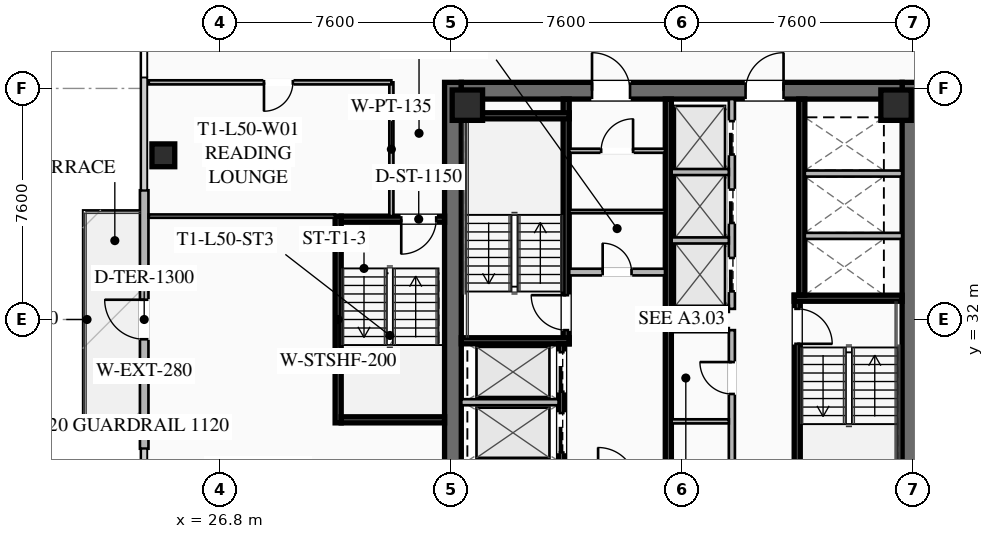
"""IFC4 building model, lengths in metres.
Left out: names, types, materials, properties, quantities, classifications, styles, units other than length and angle.
Written with IfcOpenShell. Run it as: python <this file> out.ifc"""

import sys

from ifc_helpers import new_model, si_unit, direction, frame, frame_2d, origin, origin_2d, place, context, subcontext, project, spatial, rectangle, hollow_rectangle, extrude, element, fill, save


model = new_model("IFC4")
c1 = context("Model", 3, precision=1e-05, world=origin(), true_north=direction((0.0, 1.0)))
c2 = subcontext(c1, "Body", "Model", "MODEL_VIEW")
j1 = project(units=[si_unit("LENGTHUNIT", "METRE"), si_unit("PLANEANGLEUNIT", "RADIAN")], contexts=[c1])
p1 = place(None, origin())
s1 = spatial("IfcSite", under=j1, at=p1, CompositionType="ELEMENT")
p2 = place(p1, origin())
s2 = spatial("IfcBuilding", under=s1, at=p2, CompositionType="ELEMENT")
p3 = place(p2, frame((0.0, 0.0, 185.4)))
s3 = spatial("IfcBuildingStorey", under=s2, at=p3, CompositionType="ELEMENT", Elevation=185.4)
for number, where, z_axis, x_axis in (
    (1, (34.475, 24.2, 0.0), (0.0, 0.0, 1.0), (0.0, 1.0, 0.0)),
    (2, (49.525, 39.8, 0.0), (0.0, 0.0, 1.0), (0.0, -1.0, 0.0)),
):
    element("IfcWall", number, at=place(p3, frame(where, z_axis=z_axis, x_axis=x_axis)), inside=s3, PredefinedType="SHEAR", context=c2, shape_type="SweptSolid", body=[
        extrude(rectangle(XDim=15.6, YDim=0.55, at=frame_2d((7.8, 0.0))), origin(), (0.0, 0.0, 1.0), 3.55),
    ])
p4 = place(p3, frame((34.75, 39.525, 0.0), z_axis=(0.0, 0.0, 1.0), x_axis=(1.0, 0.0, 0.0)))
e3 = element("IfcWall", 3, at=p4, inside=s3, PredefinedType="SHEAR", context=c2, shape_type="SweptSolid", body=[
    extrude(rectangle(XDim=14.5, YDim=0.55, at=frame_2d((7.25, 0.0))), origin(), (0.0, 0.0, 1.0), 3.55),
])
p5 = place(p4, frame((4.3, 0.0, 0.0)))
e4 = element("IfcOpeningElement", 4, at=p5, cuts=e3, PredefinedType="OPENING", context=c2, shape_type="SweptSolid", body=[
    extrude(rectangle(XDim=1.25, YDim=2.25, at=frame_2d((0.625, 1.125))), frame((0.0, 0.285, 0.0), z_axis=(0.0, -1.0, 0.0), x_axis=(1.0, 0.0, 0.0)), (0.0, 0.0, 1.0), 0.57),
])
p6 = place(p4, frame((9.35, 0.0, 0.0)))
e5 = element("IfcOpeningElement", 5, at=p6, cuts=e3, PredefinedType="OPENING", context=c2, shape_type="SweptSolid", body=[
    extrude(rectangle(XDim=1.25, YDim=2.25, at=frame_2d((0.625, 1.125))), frame((0.0, 0.285, 0.0), z_axis=(0.0, -1.0, 0.0), x_axis=(1.0, 0.0, 0.0)), (0.0, 0.0, 1.0), 0.57),
])
for number, where, z_axis, x_axis in (
    (6, (49.05, 39.05, 0.0), (0.0, 0.0, 1.0), (1.0, 0.0, 0.0)),
    (7, (34.95, 39.05, 0.0), (0.0, 0.0, 1.0), (1.0, 0.0, 0.0)),
):
    element("IfcColumn", number, at=place(p3, frame(where, z_axis=z_axis, x_axis=x_axis)), inside=s3, PredefinedType="COLUMN", context=c2, shape_type="SweptSolid", body=[
        extrude(hollow_rectangle(XDim=1.0, YDim=1.0, WallThickness=0.04, at=origin_2d()), origin(), (0.0, 0.0, 1.0), 3.37),
    ])
p7 = place(p3, frame((24.95, 37.4, 0.0), z_axis=(0.0, 0.0, 1.0), x_axis=(1.0, 0.0, 0.0)))
e8 = element("IfcColumn", 8, at=p7, inside=s3, PredefinedType="COLUMN", context=c2, shape_type="SweptSolid", body=[
    extrude(hollow_rectangle(XDim=0.75, YDim=0.75, WallThickness=0.032, at=origin_2d()), origin(), (0.0, 0.0, 1.0), 3.37),
])
p8 = place(p3, frame((24.32, 27.75, 0.0), z_axis=(0.0, 0.0, 1.0), x_axis=(0.0, 1.0, 0.0)))
e9 = element("IfcWall", 9, at=p8, inside=s3, PredefinedType="SOLIDWALL", context=c2, shape_type="SweptSolid", body=[
    extrude(rectangle(XDim=8.5, YDim=0.28, at=frame_2d((4.25, 0.0))), origin(), (0.0, 0.0, 1.0), 3.37),
])
p9 = place(p8, frame((3.6, 0.0, 0.0)))
e10 = element("IfcOpeningElement", 10, at=p9, cuts=e9, PredefinedType="OPENING", context=c2, shape_type="SweptSolid", body=[
    extrude(rectangle(XDim=1.3, YDim=2.15, at=frame_2d((0.65, 1.075))), frame((0.0, 0.15, 0.0), z_axis=(0.0, -1.0, 0.0), x_axis=(1.0, 0.0, 0.0)), (0.0, 0.0, 1.0), 0.3),
])
p10 = place(p3, frame((38.2, 31.2, 0.0), z_axis=(0.0, 0.0, 1.0), x_axis=(0.0, 1.0, 0.0)))
e11 = element("IfcWall", 11, at=p10, inside=s3, PredefinedType="SHEAR", context=c2, shape_type="SweptSolid", body=[
    extrude(rectangle(XDim=8.05, YDim=0.2, at=frame_2d((4.025, 0.0))), origin(), (0.0, 0.0, 1.0), 3.37),
])
p11 = place(p10, frame((0.45, 0.0, 0.0)))
e12 = element("IfcOpeningElement", 12, at=p11, cuts=e11, PredefinedType="OPENING", context=c2, shape_type="SweptSolid", body=[
    extrude(rectangle(XDim=1.15, YDim=2.2, at=frame_2d((0.575, 1.1))), frame((0.0, 0.11, 0.0), z_axis=(0.0, -1.0, 0.0), x_axis=(1.0, 0.0, 0.0)), (0.0, 0.0, 1.0), 0.22),
])
for number, where, z_axis, x_axis in (
    (13, (34.75, 31.3, 0.0), (0.0, 0.0, 1.0), (1.0, 0.0, 0.0)),
    (14, (34.75, 38.7, 0.0), (0.0, 0.0, 1.0), (1.0, 0.0, 0.0)),
):
    element("IfcWall", number, at=place(p3, frame(where, z_axis=z_axis, x_axis=x_axis)), inside=s3, PredefinedType="SHEAR", context=c2, shape_type="SweptSolid", body=[
        extrude(rectangle(XDim=3.55, YDim=0.2, at=frame_2d((1.775, 0.0))), origin(), (0.0, 0.0, 1.0), 3.37),
    ])
p12 = place(p3, frame((45.8, 32.8, 0.0), z_axis=(0.0, 0.0, 1.0), x_axis=(0.0, -1.0, 0.0)))
e15 = element("IfcWall", 15, at=p12, inside=s3, PredefinedType="SHEAR", context=c2, shape_type="SweptSolid", body=[
    extrude(rectangle(XDim=8.05, YDim=0.2, at=frame_2d((4.025, 0.0))), origin(), (0.0, 0.0, 1.0), 3.37),
])
p13 = place(p12, frame((0.45, 0.0, 0.0)))
e16 = element("IfcOpeningElement", 16, at=p13, cuts=e15, PredefinedType="OPENING", context=c2, shape_type="SweptSolid", body=[
    extrude(rectangle(XDim=1.15, YDim=2.2, at=frame_2d((0.575, 1.1))), frame((0.0, 0.11, 0.0), z_axis=(0.0, -1.0, 0.0), x_axis=(1.0, 0.0, 0.0)), (0.0, 0.0, 1.0), 0.22),
])
p14 = place(p3, frame((45.7, 32.7, 0.0), z_axis=(0.0, 0.0, 1.0), x_axis=(1.0, 0.0, 0.0)))
e17 = element("IfcWall", 17, at=p14, inside=s3, PredefinedType="SHEAR", context=c2, shape_type="SweptSolid", body=[
    extrude(rectangle(XDim=3.55, YDim=0.2, at=frame_2d((1.775, 0.0))), origin(), (0.0, 0.0, 1.0), 3.37),
])
p15 = place(p3, frame((41.56, 24.75, 0.0), z_axis=(0.0, 0.0, 1.0), x_axis=(0.0, 1.0, 0.0)))
e18 = element("IfcWall", 18, at=p15, inside=s3, PredefinedType="SHEAR", context=c2, shape_type="SweptSolid", body=[
    extrude(rectangle(XDim=14.5, YDim=0.2, at=frame_2d((7.25, 0.0))), origin(), (0.0, 0.0, 1.0), 3.37),
])
p16 = place(p3, frame((38.3, 33.56, 0.0), z_axis=(0.0, 0.0, 1.0), x_axis=(1.0, 0.0, 0.0)))
e19 = element("IfcWall", 19, at=p16, inside=s3, PredefinedType="SOLIDWALL", context=c2, shape_type="SweptSolid", body=[
    extrude(rectangle(XDim=3.15, YDim=0.22, at=frame_2d((1.575, 0.0))), origin(), (0.0, 0.0, 1.0), 2.723),
])
p17 = place(p16, frame((1.1, 0.0, 0.0)))
e20 = element("IfcOpeningElement", 20, at=p17, cuts=e19, PredefinedType="OPENING", context=c2, shape_type="SweptSolid", body=[
    extrude(rectangle(XDim=0.95, YDim=2.05, at=frame_2d((0.475, 1.025))), frame((0.0, 0.12, 0.0), z_axis=(0.0, -1.0, 0.0), x_axis=(1.0, 0.0, 0.0)), (0.0, 0.0, 1.0), 0.24),
])
p18 = place(p3, frame((38.05, 24.75, 0.0), z_axis=(0.0, 0.0, 1.0), x_axis=(0.0, 1.0, 0.0)))
e21 = element("IfcWall", 21, at=p18, inside=s3, PredefinedType="SHEAR", context=c2, shape_type="SweptSolid", body=[
    extrude(rectangle(XDim=6.45, YDim=0.2, at=frame_2d((3.225, 0.0))), origin(), (0.0, 0.0, 1.0), 3.37),
])
p19 = place(p18, frame((4.875, 0.0, 0.0)))
e22 = element("IfcOpeningElement", 22, at=p19, cuts=e21, PredefinedType="OPENING", context=c2, shape_type="SweptSolid", body=[
    extrude(rectangle(XDim=1.3, YDim=2.25, at=frame_2d((0.65, 1.125))), frame((0.0, 0.11, 0.0), z_axis=(0.0, -1.0, 0.0), x_axis=(1.0, 0.0, 0.0)), (0.0, 0.0, 1.0), 0.22),
])
p20 = place(p18, frame((2.875, 0.0, 0.0)))
e23 = element("IfcOpeningElement", 23, at=p20, cuts=e21, PredefinedType="OPENING", context=c2, shape_type="SweptSolid", body=[
    extrude(rectangle(XDim=1.3, YDim=2.25, at=frame_2d((0.65, 1.125))), frame((0.0, 0.11, 0.0), z_axis=(0.0, -1.0, 0.0), x_axis=(1.0, 0.0, 0.0)), (0.0, 0.0, 1.0), 0.22),
])
p21 = place(p18, frame((0.675, 0.0, 0.0)))
e24 = element("IfcOpeningElement", 24, at=p21, cuts=e21, PredefinedType="OPENING", context=c2, shape_type="SweptSolid", body=[
    extrude(rectangle(XDim=1.3, YDim=2.25, at=frame_2d((0.65, 1.125))), frame((0.0, 0.11, 0.0), z_axis=(0.0, -1.0, 0.0), x_axis=(1.0, 0.0, 0.0)), (0.0, 0.0, 1.0), 0.22),
])
p22 = place(p3, frame((34.75, 29.28, 0.0), z_axis=(0.0, 0.0, 1.0), x_axis=(1.0, 0.0, 0.0)))
e25 = element("IfcWall", 25, at=p22, inside=s3, PredefinedType="SOLIDWALL", context=c2, shape_type="SweptSolid", body=[
    extrude(rectangle(XDim=3.2, YDim=0.2, at=frame_2d((1.6, 0.0))), origin(), (0.0, 0.0, 1.0), 3.37),
])
p23 = place(p3, frame((45.95, 39.25, 0.0), z_axis=(0.0, 0.0, 1.0), x_axis=(0.0, -1.0, 0.0)))
e26 = element("IfcWall", 26, at=p23, inside=s3, PredefinedType="SHEAR", context=c2, shape_type="SweptSolid", body=[
    extrude(rectangle(XDim=6.45, YDim=0.2, at=frame_2d((3.225, 0.0))), origin(), (0.0, 0.0, 1.0), 3.37),
])
for number, where, z_axis, x_axis in (
    (27, (46.05, 34.75, 0.0), (0.0, 0.0, 1.0), (1.0, 0.0, 0.0)),
    (28, (46.05, 36.8, 0.0), (0.0, 0.0, 1.0), (1.0, 0.0, 0.0)),
):
    element("IfcWall", number, at=place(p3, frame(where, z_axis=z_axis, x_axis=x_axis)), inside=s3, PredefinedType="SOLIDWALL", context=c2, shape_type="SweptSolid", body=[
        extrude(rectangle(XDim=3.2, YDim=0.2, at=frame_2d((1.6, 0.0))), origin(), (0.0, 0.0, 1.0), 3.37),
    ])
p24 = place(p3, frame((38.3, 37.55, 0.0), z_axis=(0.0, 0.0, 1.0), x_axis=(1.0, 0.0, 0.0)))
e29 = element("IfcWall", 29, at=p24, inside=s3, PredefinedType="PARTITIONING", context=c2, shape_type="SweptSolid", body=[
    extrude(rectangle(XDim=3.15, YDim=0.135, at=frame_2d((1.575, 0.0))), origin(), (0.0, 0.0, 1.0), 2.723),
])
p25 = place(p24, frame((1.05, 0.0, 0.0)))
e30 = element("IfcOpeningElement", 30, at=p25, cuts=e29, PredefinedType="OPENING", context=c2, shape_type="SweptSolid", body=[
    extrude(rectangle(XDim=1.05, YDim=2.2, at=frame_2d((0.525, 1.1))), frame((0.0, 0.077, 0.0), z_axis=(0.0, -1.0, 0.0), x_axis=(1.0, 0.0, 0.0)), (0.0, 0.0, 1.0), 0.155),
])
p26 = place(p3, frame((38.3, 35.55, 0.0), z_axis=(0.0, 0.0, 1.0), x_axis=(1.0, 0.0, 0.0)))
e31 = element("IfcWall", 31, at=p26, inside=s3, PredefinedType="PARTITIONING", context=c2, shape_type="SweptSolid", body=[
    extrude(rectangle(XDim=3.15, YDim=0.11, at=frame_2d((1.575, 0.0))), origin(), (0.0, 0.0, 1.0), 2.723),
])
p27 = place(p3, frame((43.65, 24.75, 0.0), z_axis=(0.0, 0.0, 1.0), x_axis=(0.0, 1.0, 0.0)))
e32 = element("IfcWall", 32, at=p27, inside=s3, PredefinedType="SOLIDWALL", context=c2, shape_type="SweptSolid", body=[
    extrude(rectangle(XDim=6.9, YDim=0.2, at=frame_2d((3.45, 0.0))), origin(), (0.0, 0.0, 1.0), 2.723),
])
p28 = place(p27, frame((0.85, 0.0, 0.0)))
e33 = element("IfcOpeningElement", 33, at=p28, cuts=e32, PredefinedType="OPENING", context=c2, shape_type="SweptSolid", body=[
    extrude(rectangle(XDim=0.95, YDim=2.05, at=frame_2d((0.475, 1.025))), frame((0.0, 0.11, 0.0), z_axis=(0.0, -1.0, 0.0), x_axis=(1.0, 0.0, 0.0)), (0.0, 0.0, 1.0), 0.22),
])
p29 = place(p27, frame((4.8, 0.0, 0.0)))
e34 = element("IfcOpeningElement", 34, at=p29, cuts=e32, PredefinedType="OPENING", context=c2, shape_type="SweptSolid", body=[
    extrude(rectangle(XDim=1.05, YDim=2.2, at=frame_2d((0.525, 1.1))), frame((0.0, 0.11, 0.0), z_axis=(0.0, -1.0, 0.0), x_axis=(1.0, 0.0, 0.0)), (0.0, 0.0, 1.0), 0.22),
])
for number, where, z_axis, x_axis in (
    (35, (41.67, 31.65, 0.0), (0.0, 0.0, 1.0), (1.0, 0.0, 0.0)),
    (36, (41.67, 28.65, 0.0), (0.0, 0.0, 1.0), (1.0, 0.0, 0.0)),
):
    element("IfcWall", number, at=place(p3, frame(where, z_axis=z_axis, x_axis=x_axis)), inside=s3, PredefinedType="PARTITIONING", context=c2, shape_type="SweptSolid", body=[
        extrude(rectangle(XDim=1.88, YDim=0.135, at=frame_2d((0.94, 0.0))), origin(), (0.0, 0.0, 1.0), 2.723),
    ])
p30 = place(p3, frame((43.65, 32.35, 0.0), z_axis=(0.0, 0.0, 1.0), x_axis=(0.0, 1.0, 0.0)))
e37 = element("IfcWall", 37, at=p30, inside=s3, PredefinedType="SOLIDWALL", context=c2, shape_type="SweptSolid", body=[
    extrude(rectangle(XDim=6.9, YDim=0.2, at=frame_2d((3.45, 0.0))), origin(), (0.0, 0.0, 1.0), 3.37),
])
p31 = place(p30, frame((0.575, 0.0, 0.0)))
e38 = element("IfcOpeningElement", 38, at=p31, cuts=e37, PredefinedType="OPENING", context=c2, shape_type="SweptSolid", body=[
    extrude(rectangle(XDim=1.1, YDim=2.2, at=frame_2d((0.55, 1.1))), frame((0.0, 0.11, 0.0), z_axis=(0.0, -1.0, 0.0), x_axis=(1.0, 0.0, 0.0)), (0.0, 0.0, 1.0), 0.22),
])
p32 = place(p30, frame((2.825, 0.0, 0.0)))
e39 = element("IfcOpeningElement", 39, at=p32, cuts=e37, PredefinedType="OPENING", context=c2, shape_type="SweptSolid", body=[
    extrude(rectangle(XDim=1.1, YDim=2.2, at=frame_2d((0.55, 1.1))), frame((0.0, 0.11, 0.0), z_axis=(0.0, -1.0, 0.0), x_axis=(1.0, 0.0, 0.0)), (0.0, 0.0, 1.0), 0.22),
])
p33 = place(p30, frame((5.075, 0.0, 0.0)))
e40 = element("IfcOpeningElement", 40, at=p33, cuts=e37, PredefinedType="OPENING", context=c2, shape_type="SweptSolid", body=[
    extrude(rectangle(XDim=1.1, YDim=2.2, at=frame_2d((0.55, 1.1))), frame((0.0, 0.11, 0.0), z_axis=(0.0, -1.0, 0.0), x_axis=(1.0, 0.0, 0.0)), (0.0, 0.0, 1.0), 0.22),
])
for number, where, z_axis, x_axis in (
    (41, (41.67, 32.35, 0.0), (0.0, 0.0, 1.0), (1.0, 0.0, 0.0)),
    (42, (41.67, 34.6, 0.0), (0.0, 0.0, 1.0), (1.0, 0.0, 0.0)),
    (43, (41.67, 36.85, 0.0), (0.0, 0.0, 1.0), (1.0, 0.0, 0.0)),
):
    element("IfcWall", number, at=place(p3, frame(where, z_axis=z_axis, x_axis=x_axis)), inside=s3, PredefinedType="SOLIDWALL", context=c2, shape_type="SweptSolid", body=[
        extrude(rectangle(XDim=1.88, YDim=0.2, at=frame_2d((0.94, 0.0))), origin(), (0.0, 0.0, 1.0), 3.37),
    ])
p34 = place(p3, frame((30.7, 28.6, 0.0), z_axis=(0.0, 0.0, 1.0), x_axis=(0.0, 1.0, 0.0)))
e44 = element("IfcWall", 44, at=p34, inside=s3, PredefinedType="SHEAR", context=c2, shape_type="SweptSolid", body=[
    extrude(rectangle(XDim=6.8, YDim=0.2, at=frame_2d((3.4, 0.0))), origin(), (0.0, 0.0, 1.0), 3.37),
])
p35 = place(p3, frame((34.2, 35.3, 0.0), z_axis=(0.0, 0.0, 1.0), x_axis=(-1.0, 0.0, 0.0)))
e45 = element("IfcWall", 45, at=p35, inside=s3, PredefinedType="SHEAR", context=c2, shape_type="SweptSolid", body=[
    extrude(rectangle(XDim=3.4, YDim=0.2, at=frame_2d((1.7, 0.0))), origin(), (0.0, 0.0, 1.0), 3.37),
])
p36 = place(p35, frame((0.275, 0.0, 0.0)))
e46 = element("IfcOpeningElement", 46, at=p36, cuts=e45, PredefinedType="OPENING", context=c2, shape_type="SweptSolid", body=[
    extrude(rectangle(XDim=1.15, YDim=2.2, at=frame_2d((0.575, 1.1))), frame((0.0, 0.11, 0.0), z_axis=(0.0, -1.0, 0.0), x_axis=(1.0, 0.0, 0.0)), (0.0, 0.0, 1.0), 0.22),
])
p37 = place(p3, frame((30.8, 28.7, 0.0), z_axis=(0.0, 0.0, 1.0), x_axis=(1.0, 0.0, 0.0)))
e47 = element("IfcWall", 47, at=p37, inside=s3, PredefinedType="SHEAR", context=c2, shape_type="SweptSolid", body=[
    extrude(rectangle(XDim=3.4, YDim=0.2, at=frame_2d((1.7, 0.0))), origin(), (0.0, 0.0, 1.0), 3.37),
])
p38 = place(p3, frame((32.45, 35.4, 0.0), z_axis=(0.0, 0.0, 1.0), x_axis=(0.0, 1.0, 0.0)))
e48 = element("IfcWall", 48, at=p38, inside=s3, PredefinedType="PARTITIONING", context=c2, shape_type="SweptSolid", body=[
    extrude(rectangle(XDim=4.4, YDim=0.135, at=frame_2d((2.2, 0.0))), origin(), (0.0, 0.0, 1.0), 2.723),
])
p39 = place(p3, frame((32.45, 39.8, 0.0), z_axis=(0.0, 0.0, 1.0), x_axis=(-1.0, 0.0, 0.0)))
e49 = element("IfcWall", 49, at=p39, inside=s3, PredefinedType="PARTITIONING", context=c2, shape_type="SweptSolid", body=[
    extrude(rectangle(XDim=7.98, YDim=0.135, at=frame_2d((3.99, 0.0))), origin(), (0.0, 0.0, 1.0), 2.723),
])
p40 = place(p39, frame((3.24, 0.0, 0.0)))
e50 = element("IfcOpeningElement", 50, at=p40, cuts=e49, PredefinedType="OPENING", context=c2, shape_type="SweptSolid", body=[
    extrude(rectangle(XDim=0.95, YDim=2.05, at=frame_2d((0.475, 1.025))), frame((0.0, 0.077, 0.0), z_axis=(0.0, -1.0, 0.0), x_axis=(1.0, 0.0, 0.0)), (0.0, 0.0, 1.0), 0.155),
])
p41 = place(p3, frame((30.6, 35.4, 0.0), z_axis=(0.0, 0.0, 1.0), x_axis=(-1.0, 0.0, 0.0)))
e51 = element("IfcWall", 51, at=p41, inside=s3, PredefinedType="PARTITIONING", context=c2, shape_type="SweptSolid", body=[
    extrude(rectangle(XDim=6.13, YDim=0.11, at=frame_2d((3.065, 0.0))), origin(), (0.0, 0.0, 1.0), 2.723),
])
p42 = place(p9, origin())
e52 = element("IfcDoor", 52, at=p42, inside=s3, OperationType="SINGLE_SWING_RIGHT", PredefinedType="DOOR", context=c2, shape_type="SweptSolid", body=[
    extrude(rectangle(XDim=1.3, YDim=2.15, at=frame_2d((0.65, 1.075))), frame((0.0, 0.025, 0.0), z_axis=(0.0, -1.0, 0.0), x_axis=(1.0, 0.0, 0.0)), (0.0, 0.0, 1.0), 0.05),
])
fill(e10, e52)
p43 = place(p5, origin())
e53 = element("IfcDoor", 53, at=p43, inside=s3, OperationType="SINGLE_SWING_LEFT", PredefinedType="DOOR", context=c2, shape_type="SweptSolid", body=[
    extrude(rectangle(XDim=1.25, YDim=2.25, at=frame_2d((0.625, 1.125))), frame((0.0, 0.025, 0.0), z_axis=(0.0, -1.0, 0.0), x_axis=(1.0, 0.0, 0.0)), (0.0, 0.0, 1.0), 0.05),
])
fill(e4, e53)
p44 = place(p6, origin())
e54 = element("IfcDoor", 54, at=p44, inside=s3, OperationType="SINGLE_SWING_RIGHT", PredefinedType="DOOR", context=c2, shape_type="SweptSolid", body=[
    extrude(rectangle(XDim=1.25, YDim=2.25, at=frame_2d((0.625, 1.125))), frame((0.0, 0.025, 0.0), z_axis=(0.0, -1.0, 0.0), x_axis=(1.0, 0.0, 0.0)), (0.0, 0.0, 1.0), 0.05),
])
fill(e5, e54)
p45 = place(p11, origin())
e55 = element("IfcDoor", 55, at=p45, inside=s3, OperationType="SINGLE_SWING_RIGHT", PredefinedType="DOOR", context=c2, shape_type="SweptSolid", body=[
    extrude(rectangle(XDim=1.15, YDim=2.2, at=frame_2d((0.575, 1.1))), frame((0.0, 0.025, 0.0), z_axis=(0.0, -1.0, 0.0), x_axis=(1.0, 0.0, 0.0)), (0.0, 0.0, 1.0), 0.05),
])
fill(e12, e55)
p46 = place(p13, origin())
e56 = element("IfcDoor", 56, at=p46, inside=s3, OperationType="SINGLE_SWING_RIGHT", PredefinedType="DOOR", context=c2, shape_type="SweptSolid", body=[
    extrude(rectangle(XDim=1.15, YDim=2.2, at=frame_2d((0.575, 1.1))), frame((0.0, 0.025, 0.0), z_axis=(0.0, -1.0, 0.0), x_axis=(1.0, 0.0, 0.0)), (0.0, 0.0, 1.0), 0.05),
])
fill(e16, e56)
p47 = place(p25, origin())
e57 = element("IfcDoor", 57, at=p47, inside=s3, OperationType="SINGLE_SWING_RIGHT", PredefinedType="DOOR", context=c2, shape_type="SweptSolid", body=[
    extrude(rectangle(XDim=1.05, YDim=2.2, at=frame_2d((0.525, 1.1))), frame((0.0, 0.025, 0.0), z_axis=(0.0, -1.0, 0.0), x_axis=(1.0, 0.0, 0.0)), (0.0, 0.0, 1.0), 0.05),
])
fill(e30, e57)
p48 = place(p17, origin())
e58 = element("IfcDoor", 58, at=p48, inside=s3, OperationType="SINGLE_SWING_LEFT", PredefinedType="DOOR", context=c2, shape_type="SweptSolid", body=[
    extrude(rectangle(XDim=0.95, YDim=2.05, at=frame_2d((0.475, 1.025))), frame((0.0, 0.025, 0.0), z_axis=(0.0, -1.0, 0.0), x_axis=(1.0, 0.0, 0.0)), (0.0, 0.0, 1.0), 0.05),
])
fill(e20, e58)
p49 = place(p29, origin())
e59 = element("IfcDoor", 59, at=p49, inside=s3, OperationType="SINGLE_SWING_RIGHT", PredefinedType="DOOR", context=c2, shape_type="SweptSolid", body=[
    extrude(rectangle(XDim=1.05, YDim=2.2, at=frame_2d((0.525, 1.1))), frame((0.0, 0.025, 0.0), z_axis=(0.0, -1.0, 0.0), x_axis=(1.0, 0.0, 0.0)), (0.0, 0.0, 1.0), 0.05),
])
fill(e34, e59)
p50 = place(p36, origin())
e60 = element("IfcDoor", 60, at=p50, inside=s3, OperationType="SINGLE_SWING_RIGHT", PredefinedType="DOOR", context=c2, shape_type="SweptSolid", body=[
    extrude(rectangle(XDim=1.15, YDim=2.2, at=frame_2d((0.575, 1.1))), frame((0.0, 0.025, 0.0), z_axis=(0.0, -1.0, 0.0), x_axis=(1.0, 0.0, 0.0)), (0.0, 0.0, 1.0), 0.05),
])
fill(e46, e60)
p51 = place(p40, origin())
e61 = element("IfcDoor", 61, at=p51, inside=s3, OperationType="SINGLE_SWING_RIGHT", PredefinedType="DOOR", context=c2, shape_type="SweptSolid", body=[
    extrude(rectangle(XDim=0.95, YDim=2.05, at=frame_2d((0.475, 1.025))), frame((0.0, 0.025, 0.0), z_axis=(0.0, -1.0, 0.0), x_axis=(1.0, 0.0, 0.0)), (0.0, 0.0, 1.0), 0.05),
])
fill(e50, e61)
p52 = place(p19, origin())
e62 = element("IfcDoor", 62, at=p52, inside=s3, OperationType="SLIDING_TO_LEFT", PredefinedType="DOOR", context=c2, shape_type="SweptSolid", body=[
    extrude(rectangle(XDim=1.3, YDim=2.25, at=frame_2d((0.65, 1.125))), frame((0.0, 0.025, 0.0), z_axis=(0.0, -1.0, 0.0), x_axis=(1.0, 0.0, 0.0)), (0.0, 0.0, 1.0), 0.05),
])
fill(e22, e62)
p53 = place(p20, origin())
e63 = element("IfcDoor", 63, at=p53, inside=s3, OperationType="SLIDING_TO_LEFT", PredefinedType="DOOR", context=c2, shape_type="SweptSolid", body=[
    extrude(rectangle(XDim=1.3, YDim=2.25, at=frame_2d((0.65, 1.125))), frame((0.0, 0.025, 0.0), z_axis=(0.0, -1.0, 0.0), x_axis=(1.0, 0.0, 0.0)), (0.0, 0.0, 1.0), 0.05),
])
fill(e23, e63)
p54 = place(p31, origin())
e64 = element("IfcDoor", 64, at=p54, inside=s3, OperationType="SLIDING_TO_LEFT", PredefinedType="DOOR", context=c2, shape_type="SweptSolid", body=[
    extrude(rectangle(XDim=1.1, YDim=2.2, at=frame_2d((0.55, 1.1))), frame((0.0, 0.025, 0.0), z_axis=(0.0, -1.0, 0.0), x_axis=(1.0, 0.0, 0.0)), (0.0, 0.0, 1.0), 0.05),
])
fill(e38, e64)
p55 = place(p32, origin())
e65 = element("IfcDoor", 65, at=p55, inside=s3, OperationType="SLIDING_TO_LEFT", PredefinedType="DOOR", context=c2, shape_type="SweptSolid", body=[
    extrude(rectangle(XDim=1.1, YDim=2.2, at=frame_2d((0.55, 1.1))), frame((0.0, 0.025, 0.0), z_axis=(0.0, -1.0, 0.0), x_axis=(1.0, 0.0, 0.0)), (0.0, 0.0, 1.0), 0.05),
])
fill(e39, e65)
p56 = place(p33, origin())
e66 = element("IfcDoor", 66, at=p56, inside=s3, OperationType="SLIDING_TO_LEFT", PredefinedType="DOOR", context=c2, shape_type="SweptSolid", body=[
    extrude(rectangle(XDim=1.1, YDim=2.2, at=frame_2d((0.55, 1.1))), frame((0.0, 0.025, 0.0), z_axis=(0.0, -1.0, 0.0), x_axis=(1.0, 0.0, 0.0)), (0.0, 0.0, 1.0), 0.05),
])
fill(e40, e66)
save(model, sys.argv[1])
